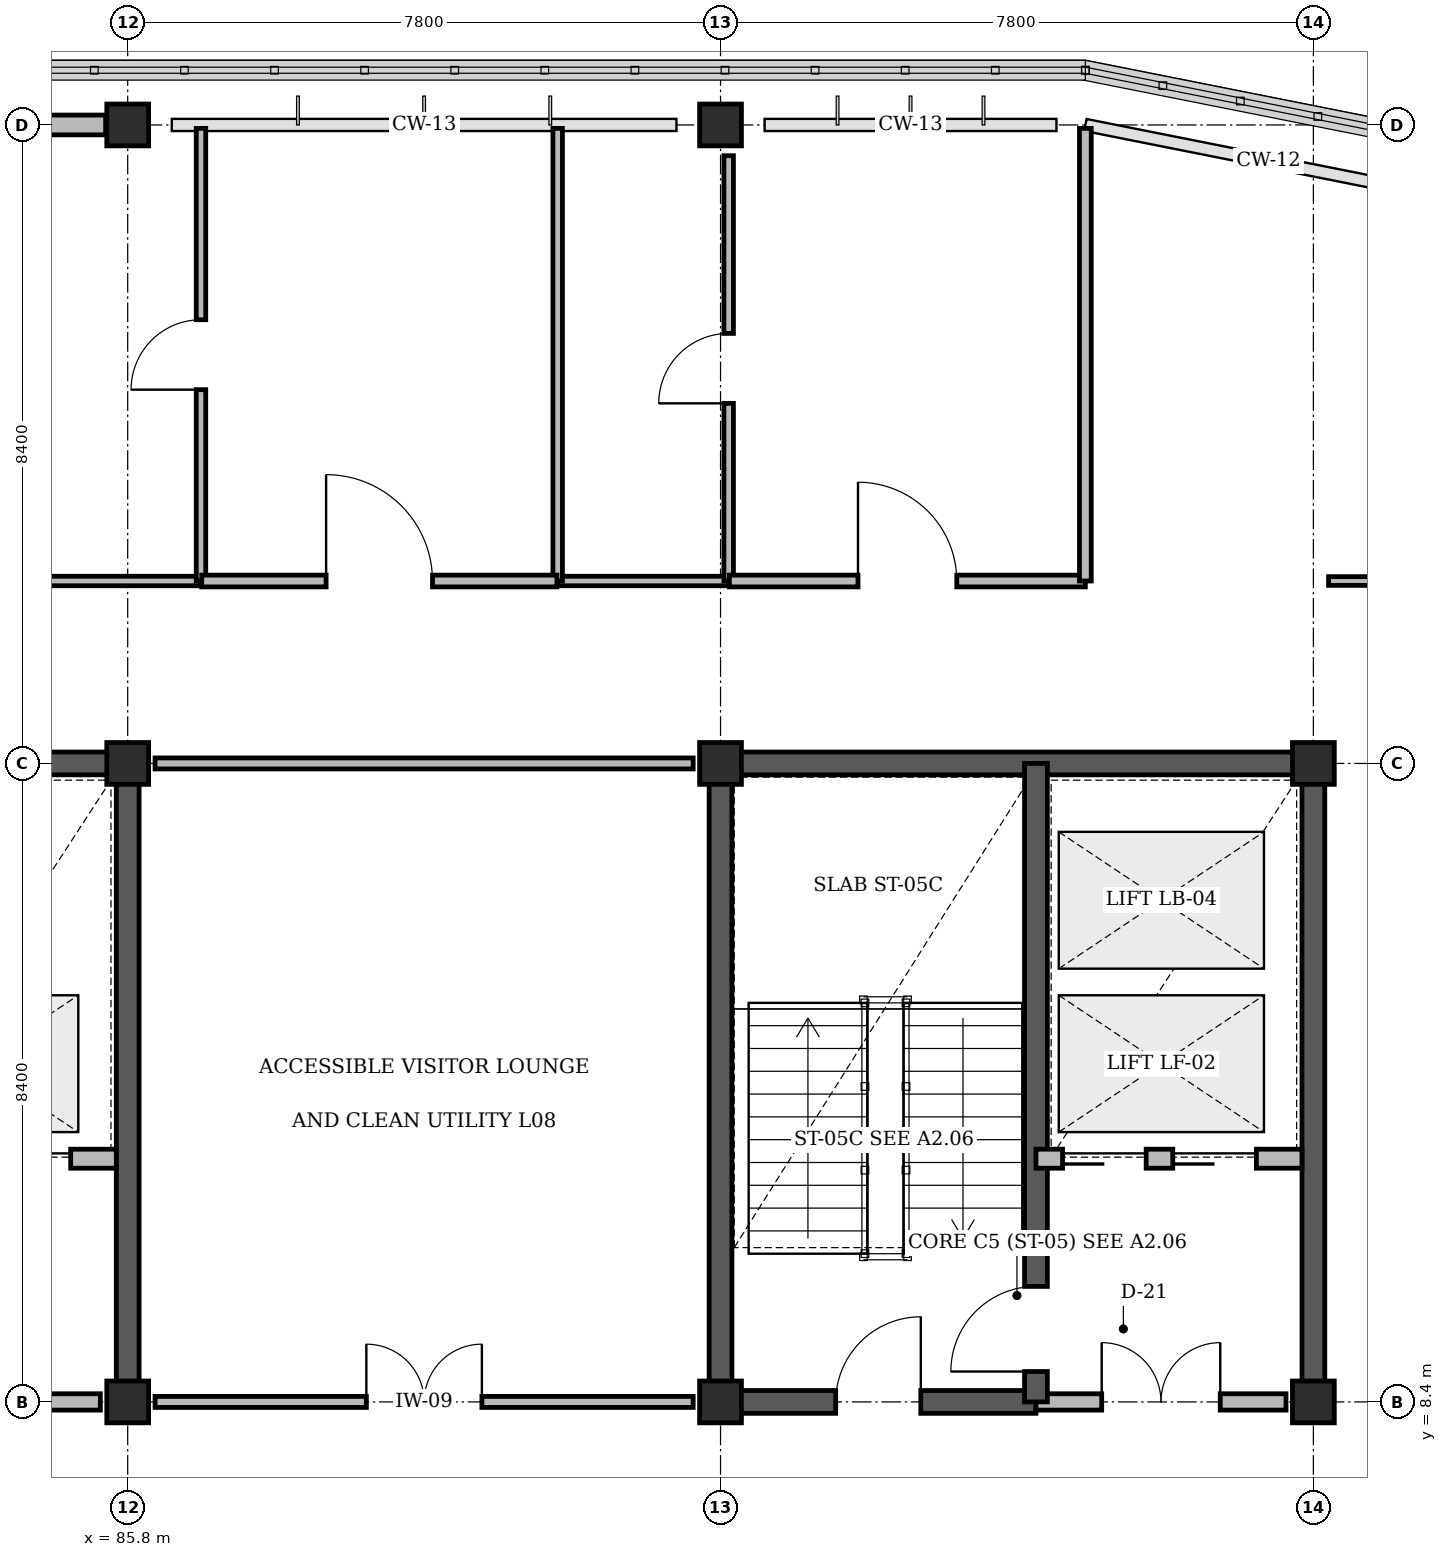
"""IFC4 building model, lengths in metres.
Left out: names, types, materials, properties, quantities, classifications, styles, units other than length and angle.
Written with IfcOpenShell. Run it as: python <this file> out.ifc"""

import sys

from ifc_helpers import new_model, si_unit, direction, frame, frame_2d, origin, origin_2d, place, context, subcontext, project, spatial, rectangle, extrude, element, fill, save


model = new_model("IFC4")
c1 = context("Model", 3, precision=1e-05, world=origin(), true_north=direction((0.0, 1.0)))
c2 = subcontext(c1, "Body", "Model", "MODEL_VIEW")
j1 = project(units=[si_unit("LENGTHUNIT", "METRE"), si_unit("PLANEANGLEUNIT", "RADIAN")], contexts=[c1])
p1 = place(None, origin())
s1 = spatial("IfcSite", under=j1, at=p1, CompositionType="ELEMENT")
p2 = place(p1, origin())
s2 = spatial("IfcBuilding", under=s1, at=p2, CompositionType="ELEMENT")
p3 = place(p2, frame((0.0, 0.0, 34.8)))
s3 = spatial("IfcBuildingStorey", under=s2, at=p3, CompositionType="ELEMENT", Elevation=34.8)
p4 = place(p3, frame((77.85, 16.8, 0.0), z_axis=(0.0, 0.0, 1.0), x_axis=(1.0, 0.0, 0.0)))
e1 = element("IfcWall", 1, at=p4, inside=s3, PredefinedType="SHEAR", context=c2, shape_type="SweptSolid", body=[
    extrude(rectangle(XDim=8.1, YDim=0.3, at=frame_2d((4.05, 0.0))), origin(), (0.0, 0.0, 1.0), 3.92),
])
p5 = place(p3, frame((85.8, 8.4, 0.0), z_axis=(0.0, 0.0, 1.0), x_axis=(0.0, 1.0, 0.0)))
e2 = element("IfcWall", 2, at=p5, inside=s3, PredefinedType="SHEAR", context=c2, shape_type="SweptSolid", body=[
    extrude(rectangle(XDim=8.4, YDim=0.3, at=frame_2d((4.2, 0.0))), origin(), (0.0, 0.0, 1.0), 3.92),
])
p6 = place(p3, frame((93.45, 16.8, 0.0), z_axis=(0.0, 0.0, 1.0), x_axis=(1.0, 0.0, 0.0)))
e3 = element("IfcWall", 3, at=p6, inside=s3, PredefinedType="SHEAR", context=c2, shape_type="SweptSolid", body=[
    extrude(rectangle(XDim=8.1, YDim=0.3, at=frame_2d((4.05, 0.0))), origin(), (0.0, 0.0, 1.0), 3.92),
])
for number, where, z_axis, x_axis in (
    (4, (93.6, 8.4, 0.0), (0.0, 0.0, 1.0), (0.0, 1.0, 0.0)),
    (5, (101.4, 8.4, 0.0), (0.0, 0.0, 1.0), (0.0, 1.0, 0.0)),
):
    element("IfcWall", number, at=place(p3, frame(where, z_axis=z_axis, x_axis=x_axis)), inside=s3, PredefinedType="SHEAR", context=c2, shape_type="SweptSolid", body=[
        extrude(rectangle(XDim=8.4, YDim=0.3, at=frame_2d((4.2, 0.0))), origin(), (0.0, 0.0, 1.0), 3.92),
    ])
for number, where, z_axis, x_axis in (
    (6, (85.8, 8.4, 0.0), (0.0, 0.0, 1.0), (1.0, 0.0, 0.0)),
    (7, (85.8, 16.8, 0.0), (0.0, 0.0, 1.0), (1.0, 0.0, 0.0)),
    (8, (85.8, 25.2, 0.0), (0.0, 0.0, 1.0), (1.0, 0.0, 0.0)),
    (9, (93.6, 8.4, 0.0), (0.0, 0.0, 1.0), (1.0, 0.0, 0.0)),
    (10, (93.6, 16.8, 0.0), (0.0, 0.0, 1.0), (1.0, 0.0, 0.0)),
    (11, (93.6, 25.2, 0.0), (0.0, 0.0, 1.0), (1.0, 0.0, 0.0)),
    (12, (101.4, 8.4, 0.0), (0.0, 0.0, 1.0), (1.0, 0.0, 0.0)),
    (13, (101.4, 16.8, 0.0), (0.0, 0.0, 1.0), (1.0, 0.0, 0.0)),
):
    element("IfcColumn", number, at=place(p3, frame(where, z_axis=z_axis, x_axis=x_axis)), inside=s3, PredefinedType="COLUMN", context=c2, shape_type="SweptSolid", body=[
        extrude(rectangle(XDim=0.55, YDim=0.55, at=origin_2d()), origin(), (0.0, 0.0, 1.0), 4.2),
    ])
p7 = place(p3, frame((78.29, 25.2, 0.0), z_axis=(0.0, 0.0, 1.0), x_axis=(1.0, 0.0, 0.0)))
e14 = element("IfcWall", 14, at=p7, inside=s3, PredefinedType="STANDARD", context=c2, shape_type="SweptSolid", body=[
    extrude(rectangle(XDim=7.22, YDim=0.26, at=frame_2d((3.61, 0.0))), origin(), (0.0, 0.0, 1.0), 3.355),
])
p8 = place(p7, frame((1.607, 0.0, 0.85)))
e15 = element("IfcOpeningElement", 15, at=p8, cuts=e14, PredefinedType="OPENING", context=c2, shape_type="SweptSolid", body=[
    extrude(rectangle(XDim=1.2, YDim=1.5, at=frame_2d((0.6, 0.75))), frame((0.0, 0.14, 0.0), z_axis=(0.0, -1.0, 0.0), x_axis=(1.0, 0.0, 0.0)), (0.0, 0.0, 1.0), 0.28),
])
p9 = place(p7, frame((4.413, 0.0, 0.85)))
e16 = element("IfcOpeningElement", 16, at=p9, cuts=e14, PredefinedType="OPENING", context=c2, shape_type="SweptSolid", body=[
    extrude(rectangle(XDim=1.2, YDim=1.5, at=frame_2d((0.6, 0.75))), frame((0.0, 0.14, 0.0), z_axis=(0.0, -1.0, 0.0), x_axis=(1.0, 0.0, 0.0)), (0.0, 0.0, 1.0), 0.28),
])
p10 = place(p3, frame((82.15, 8.4, 0.0), z_axis=(0.0, 0.0, 1.0), x_axis=(1.0, 0.0, 0.0)))
e17 = element("IfcWall", 17, at=p10, inside=s3, PredefinedType="STANDARD", context=c2, shape_type="SweptSolid", body=[
    extrude(rectangle(XDim=3.29, YDim=0.215, at=frame_2d((1.645, 0.0))), origin(), (0.0, 0.0, 1.0), 3.32),
])
p11 = place(p10, frame((0.925, 0.0, 0.0)))
e18 = element("IfcOpeningElement", 18, at=p11, cuts=e17, PredefinedType="OPENING", context=c2, shape_type="SweptSolid", body=[
    extrude(rectangle(XDim=1.44, YDim=2.2, at=frame_2d((0.72, 1.1))), frame((0.0, 0.118, 0.0), z_axis=(0.0, -1.0, 0.0), x_axis=(1.0, 0.0, 0.0)), (0.0, 0.0, 1.0), 0.235),
])
p12 = place(p3, frame((82.15, 11.6, 0.0), z_axis=(0.0, 0.0, 1.0), x_axis=(1.0, 0.0, 0.0)))
e19 = element("IfcWall", 19, at=p12, inside=s3, PredefinedType="STANDARD", context=c2, shape_type="SweptSolid", body=[
    extrude(rectangle(XDim=3.5, YDim=0.25, at=frame_2d((1.75, 0.0))), origin(), (0.0, 0.0, 1.0), 3.9),
])
p13 = place(p12, frame((0.35, 0.0, 0.0)))
e20 = element("IfcOpeningElement", 20, at=p13, cuts=e19, PredefinedType="OPENING", context=c2, shape_type="SweptSolid", body=[
    extrude(rectangle(XDim=1.1, YDim=2.2, at=frame_2d((0.55, 1.1))), frame((0.0, 0.135, 0.0), z_axis=(0.0, -1.0, 0.0), x_axis=(1.0, 0.0, 0.0)), (0.0, 0.0, 1.0), 0.27),
])
p14 = place(p12, frame((1.8, 0.0, 0.0)))
e21 = element("IfcOpeningElement", 21, at=p14, cuts=e19, PredefinedType="OPENING", context=c2, shape_type="SweptSolid", body=[
    extrude(rectangle(XDim=1.1, YDim=2.2, at=frame_2d((0.55, 1.1))), frame((0.0, 0.135, 0.0), z_axis=(0.0, -1.0, 0.0), x_axis=(1.0, 0.0, 0.0)), (0.0, 0.0, 1.0), 0.27),
])
p15 = place(p3, frame((93.6, 8.4, 0.0), z_axis=(0.0, 0.0, 1.0), x_axis=(1.0, 0.0, 0.0)))
e22 = element("IfcWall", 22, at=p15, inside=s3, PredefinedType="SHEAR", context=c2, shape_type="SweptSolid", body=[
    extrude(rectangle(XDim=4.15, YDim=0.3, at=frame_2d((2.075, 0.0))), origin(), (0.0, 0.0, 1.0), 4.2),
])
p16 = place(p15, frame((1.515, 0.0, 0.0)))
e23 = element("IfcOpeningElement", 23, at=p16, cuts=e22, PredefinedType="OPENING", context=c2, shape_type="SweptSolid", body=[
    extrude(rectangle(XDim=1.12, YDim=2.15, at=frame_2d((0.56, 1.075))), frame((0.0, 0.16, 0.0), z_axis=(0.0, -1.0, 0.0), x_axis=(1.0, 0.0, 0.0)), (0.0, 0.0, 1.0), 0.32),
])
p17 = place(p3, frame((97.75, 8.4, 0.0), z_axis=(0.0, 0.0, 1.0), x_axis=(1.0, 0.0, 0.0)))
e24 = element("IfcWall", 24, at=p17, inside=s3, PredefinedType="STANDARD", context=c2, shape_type="SweptSolid", body=[
    extrude(rectangle(XDim=3.29, YDim=0.215, at=frame_2d((1.645, 0.0))), origin(), (0.0, 0.0, 1.0), 3.32),
])
p18 = place(p17, frame((0.865, 0.0, 0.0)))
e25 = element("IfcOpeningElement", 25, at=p18, cuts=e24, PredefinedType="OPENING", context=c2, shape_type="SweptSolid", body=[
    extrude(rectangle(XDim=1.56, YDim=2.2, at=frame_2d((0.78, 1.1))), frame((0.0, 0.118, 0.0), z_axis=(0.0, -1.0, 0.0), x_axis=(1.0, 0.0, 0.0)), (0.0, 0.0, 1.0), 0.235),
])
p19 = place(p3, frame((97.75, 8.4, 0.0), z_axis=(0.0, 0.0, 1.0), x_axis=(0.0, 1.0, 0.0)))
e26 = element("IfcWall", 26, at=p19, inside=s3, PredefinedType="SHEAR", context=c2, shape_type="SweptSolid", body=[
    extrude(rectangle(XDim=8.4, YDim=0.3, at=frame_2d((4.2, 0.0))), origin(), (0.0, 0.0, 1.0), 4.2),
])
p20 = place(p19, frame((0.4, 0.0, 0.0)))
e27 = element("IfcOpeningElement", 27, at=p20, cuts=e26, PredefinedType="OPENING", context=c2, shape_type="SweptSolid", body=[
    extrude(rectangle(XDim=1.12, YDim=2.15, at=frame_2d((0.56, 1.075))), frame((0.0, 0.16, 0.0), z_axis=(0.0, -1.0, 0.0), x_axis=(1.0, 0.0, 0.0)), (0.0, 0.0, 1.0), 0.32),
])
p21 = place(p3, frame((97.75, 11.6, 0.0), z_axis=(0.0, 0.0, 1.0), x_axis=(1.0, 0.0, 0.0)))
e28 = element("IfcWall", 28, at=p21, inside=s3, PredefinedType="STANDARD", context=c2, shape_type="SweptSolid", body=[
    extrude(rectangle(XDim=3.5, YDim=0.25, at=frame_2d((1.75, 0.0))), origin(), (0.0, 0.0, 1.0), 3.9),
])
p22 = place(p21, frame((0.35, 0.0, 0.0)))
e29 = element("IfcOpeningElement", 29, at=p22, cuts=e28, PredefinedType="OPENING", context=c2, shape_type="SweptSolid", body=[
    extrude(rectangle(XDim=1.1, YDim=2.2, at=frame_2d((0.55, 1.1))), frame((0.0, 0.135, 0.0), z_axis=(0.0, -1.0, 0.0), x_axis=(1.0, 0.0, 0.0)), (0.0, 0.0, 1.0), 0.27),
])
p23 = place(p21, frame((1.8, 0.0, 0.0)))
e30 = element("IfcOpeningElement", 30, at=p23, cuts=e28, PredefinedType="OPENING", context=c2, shape_type="SweptSolid", body=[
    extrude(rectangle(XDim=1.1, YDim=2.2, at=frame_2d((0.55, 1.1))), frame((0.0, 0.135, 0.0), z_axis=(0.0, -1.0, 0.0), x_axis=(1.0, 0.0, 0.0)), (0.0, 0.0, 1.0), 0.27),
])
p24 = place(p3, frame((84.514, 19.2, 0.0), z_axis=(0.0, 0.0, 1.0), x_axis=(1.0, 0.0, 0.0)))
e31 = element("IfcWall", 31, at=p24, inside=s3, PredefinedType="PARTITIONING", context=c2, shape_type="SweptSolid", body=[
    extrude(rectangle(XDim=2.25, YDim=0.125, at=frame_2d((1.125, 0.0))), origin(), (0.0, 0.0, 1.0), 3.9),
])
p25 = place(p3, frame((86.764, 19.2, 0.0), z_axis=(0.0, 0.0, 1.0), x_axis=(0.0, 1.0, 0.0)))
e32 = element("IfcWall", 32, at=p25, inside=s3, PredefinedType="PARTITIONING", context=c2, shape_type="SweptSolid", body=[
    extrude(rectangle(XDim=5.955, YDim=0.125, at=frame_2d((2.978, 0.0))), origin(), (0.0, 0.0, 1.0), 3.9),
])
p26 = place(p25, frame((2.518, 0.0, 0.0)))
e33 = element("IfcOpeningElement", 33, at=p26, cuts=e32, PredefinedType="OPENING", context=c2, shape_type="SweptSolid", body=[
    extrude(rectangle(XDim=0.92, YDim=2.1, at=frame_2d((0.46, 1.05))), frame((0.0, 0.073, 0.0), z_axis=(0.0, -1.0, 0.0), x_axis=(1.0, 0.0, 0.0)), (0.0, 0.0, 1.0), 0.145),
])
p27 = place(p3, frame((91.457, 19.2, 0.0), z_axis=(0.0, 0.0, 1.0), x_axis=(1.0, 0.0, 0.0)))
e34 = element("IfcWall", 34, at=p27, inside=s3, PredefinedType="PARTITIONING", context=c2, shape_type="SweptSolid", body=[
    extrude(rectangle(XDim=2.25, YDim=0.125, at=frame_2d((1.125, 0.0))), origin(), (0.0, 0.0, 1.0), 3.9),
])
p28 = place(p3, frame((91.457, 19.2, 0.0), z_axis=(0.0, 0.0, 1.0), x_axis=(0.0, 1.0, 0.0)))
e35 = element("IfcWall", 35, at=p28, inside=s3, PredefinedType="PARTITIONING", context=c2, shape_type="SweptSolid", body=[
    extrude(rectangle(XDim=5.955, YDim=0.125, at=frame_2d((2.978, 0.0))), origin(), (0.0, 0.0, 1.0), 3.9),
])
p29 = place(p3, frame((93.707, 19.2, 0.0), z_axis=(0.0, 0.0, 1.0), x_axis=(0.0, 1.0, 0.0)))
e36 = element("IfcWall", 36, at=p29, inside=s3, PredefinedType="PARTITIONING", context=c2, shape_type="SweptSolid", body=[
    extrude(rectangle(XDim=5.595, YDim=0.125, at=frame_2d((2.797, 0.0))), origin(), (0.0, 0.0, 1.0), 3.305),
])
p30 = place(p29, frame((2.337, 0.0, 0.0)))
e37 = element("IfcOpeningElement", 37, at=p30, cuts=e36, PredefinedType="OPENING", context=c2, shape_type="SweptSolid", body=[
    extrude(rectangle(XDim=0.92, YDim=2.1, at=frame_2d((0.46, 1.05))), frame((0.0, 0.073, 0.0), z_axis=(0.0, -1.0, 0.0), x_axis=(1.0, 0.0, 0.0)), (0.0, 0.0, 1.0), 0.145),
])
p31 = place(p3, frame((101.6, 19.2, 0.0), z_axis=(0.0, 0.0, 1.0), x_axis=(1.0, 0.0, 0.0)))
e38 = element("IfcWall", 38, at=p31, inside=s3, PredefinedType="PARTITIONING", context=c2, shape_type="SweptSolid", body=[
    extrude(rectangle(XDim=8.9, YDim=0.115, at=frame_2d((4.45, 0.0))), origin(), (0.0, 0.0, 1.0), 3.9),
])
p32 = place(p3, frame((86.774, 19.2, 0.0), z_axis=(0.0, 0.0, 1.0), x_axis=(1.0, 0.0, 0.0)))
e39 = element("IfcWall", 39, at=p32, inside=s3, PredefinedType="PARTITIONING", context=c2, shape_type="SweptSolid", body=[
    extrude(rectangle(XDim=4.673, YDim=0.155, at=frame_2d((2.336, 0.0))), origin(), (0.0, 0.0, 1.0), 3.9),
])
p33 = place(p32, frame((1.636, 0.0, 0.0)))
e40 = element("IfcOpeningElement", 40, at=p33, cuts=e39, PredefinedType="OPENING", context=c2, shape_type="SweptSolid", body=[
    extrude(rectangle(XDim=1.4, YDim=2.2, at=frame_2d((0.7, 1.1))), frame((0.0, 0.087, 0.0), z_axis=(0.0, -1.0, 0.0), x_axis=(1.0, 0.0, 0.0)), (0.0, 0.0, 1.0), 0.175),
])
p34 = place(p3, frame((93.717, 19.2, 0.0), z_axis=(0.0, 0.0, 1.0), x_axis=(1.0, 0.0, 0.0)))
e41 = element("IfcWall", 41, at=p34, inside=s3, PredefinedType="PARTITIONING", context=c2, shape_type="SweptSolid", body=[
    extrude(rectangle(XDim=4.683, YDim=0.155, at=frame_2d((2.341, 0.0))), origin(), (0.0, 0.0, 1.0), 3.9),
])
p35 = place(p34, frame((1.691, 0.0, 0.0)))
e42 = element("IfcOpeningElement", 42, at=p35, cuts=e41, PredefinedType="OPENING", context=c2, shape_type="SweptSolid", body=[
    extrude(rectangle(XDim=1.3, YDim=2.15, at=frame_2d((0.65, 1.075))), frame((0.0, 0.087, 0.0), z_axis=(0.0, -1.0, 0.0), x_axis=(1.0, 0.0, 0.0)), (0.0, 0.0, 1.0), 0.175),
])
p36 = place(p3, frame((98.4, 19.2, 0.0), z_axis=(0.0, 0.0, 1.0), x_axis=(0.0, 1.0, 0.0)))
e43 = element("IfcWall", 43, at=p36, inside=s3, PredefinedType="PARTITIONING", context=c2, shape_type="SweptSolid", body=[
    extrude(rectangle(XDim=5.955, YDim=0.155, at=frame_2d((2.978, 0.0))), origin(), (0.0, 0.0, 1.0), 3.9),
])
p37 = place(p3, frame((86.16, 8.4, 0.0), z_axis=(0.0, 0.0, 1.0), x_axis=(1.0, 0.0, 0.0)))
e44 = element("IfcWall", 44, at=p37, inside=s3, PredefinedType="PARTITIONING", context=c2, shape_type="SweptSolid", body=[
    extrude(rectangle(XDim=7.08, YDim=0.145, at=frame_2d((3.54, 0.0))), origin(), (0.0, 0.0, 1.0), 3.32),
])
p38 = place(p37, frame((2.78, 0.0, 0.0)))
e45 = element("IfcOpeningElement", 45, at=p38, cuts=e44, PredefinedType="OPENING", context=c2, shape_type="SweptSolid", body=[
    extrude(rectangle(XDim=1.52, YDim=2.2, at=frame_2d((0.76, 1.1))), frame((0.0, 0.083, 0.0), z_axis=(0.0, -1.0, 0.0), x_axis=(1.0, 0.0, 0.0)), (0.0, 0.0, 1.0), 0.165),
])
p39 = place(p3, frame((86.16, 16.8, 0.0), z_axis=(0.0, 0.0, 1.0), x_axis=(1.0, 0.0, 0.0)))
e46 = element("IfcWall", 46, at=p39, inside=s3, PredefinedType="PARTITIONING", context=c2, shape_type="SweptSolid", body=[
    extrude(rectangle(XDim=7.08, YDim=0.145, at=frame_2d((3.54, 0.0))), origin(), (0.0, 0.0, 1.0), 3.32),
])
p40 = place(p14, origin())
e47 = element("IfcDoor", 47, at=p40, inside=s3, OperationType="SLIDING_TO_LEFT", PredefinedType="DOOR", context=c2, shape_type="SweptSolid", body=[
    extrude(rectangle(XDim=1.1, YDim=2.2, at=frame_2d((0.55, 1.1))), frame((0.0, 0.025, 0.0), z_axis=(0.0, -1.0, 0.0), x_axis=(1.0, 0.0, 0.0)), (0.0, 0.0, 1.0), 0.05),
])
fill(e21, e47)
p41 = place(p16, origin())
e48 = element("IfcDoor", 48, at=p41, inside=s3, OperationType="SINGLE_SWING_RIGHT", PredefinedType="DOOR", context=c2, shape_type="SweptSolid", body=[
    extrude(rectangle(XDim=1.12, YDim=2.15, at=frame_2d((0.56, 1.075))), frame((0.0, 0.025, 0.0), z_axis=(0.0, -1.0, 0.0), x_axis=(1.0, 0.0, 0.0)), (0.0, 0.0, 1.0), 0.05),
])
fill(e23, e48)
p42 = place(p18, origin())
e49 = element("IfcDoor", 49, at=p42, inside=s3, OperationType="DOUBLE_DOOR_SINGLE_SWING", PredefinedType="DOOR", context=c2, shape_type="SweptSolid", body=[
    extrude(rectangle(XDim=1.56, YDim=2.2, at=frame_2d((0.78, 1.1))), frame((0.0, 0.025, 0.0), z_axis=(0.0, -1.0, 0.0), x_axis=(1.0, 0.0, 0.0)), (0.0, 0.0, 1.0), 0.05),
])
fill(e25, e49)
p43 = place(p20, origin())
e50 = element("IfcDoor", 50, at=p43, inside=s3, OperationType="SINGLE_SWING_LEFT", PredefinedType="DOOR", context=c2, shape_type="SweptSolid", body=[
    extrude(rectangle(XDim=1.12, YDim=2.15, at=frame_2d((0.56, 1.075))), frame((0.0, 0.025, 0.0), z_axis=(0.0, -1.0, 0.0), x_axis=(1.0, 0.0, 0.0)), (0.0, 0.0, 1.0), 0.05),
])
fill(e27, e50)
p44 = place(p22, origin())
e51 = element("IfcDoor", 51, at=p44, inside=s3, OperationType="SLIDING_TO_LEFT", PredefinedType="DOOR", context=c2, shape_type="SweptSolid", body=[
    extrude(rectangle(XDim=1.1, YDim=2.2, at=frame_2d((0.55, 1.1))), frame((0.0, 0.025, 0.0), z_axis=(0.0, -1.0, 0.0), x_axis=(1.0, 0.0, 0.0)), (0.0, 0.0, 1.0), 0.05),
])
fill(e29, e51)
p45 = place(p23, origin())
e52 = element("IfcDoor", 52, at=p45, inside=s3, OperationType="SLIDING_TO_LEFT", PredefinedType="DOOR", context=c2, shape_type="SweptSolid", body=[
    extrude(rectangle(XDim=1.1, YDim=2.2, at=frame_2d((0.55, 1.1))), frame((0.0, 0.025, 0.0), z_axis=(0.0, -1.0, 0.0), x_axis=(1.0, 0.0, 0.0)), (0.0, 0.0, 1.0), 0.05),
])
fill(e30, e52)
p46 = place(p26, origin())
e53 = element("IfcDoor", 53, at=p46, inside=s3, OperationType="SINGLE_SWING_LEFT", PredefinedType="DOOR", context=c2, shape_type="SweptSolid", body=[
    extrude(rectangle(XDim=0.92, YDim=2.1, at=frame_2d((0.46, 1.05))), frame((0.0, 0.025, 0.0), z_axis=(0.0, -1.0, 0.0), x_axis=(1.0, 0.0, 0.0)), (0.0, 0.0, 1.0), 0.05),
])
fill(e33, e53)
p47 = place(p30, origin())
e54 = element("IfcDoor", 54, at=p47, inside=s3, OperationType="SINGLE_SWING_LEFT", PredefinedType="DOOR", context=c2, shape_type="SweptSolid", body=[
    extrude(rectangle(XDim=0.92, YDim=2.1, at=frame_2d((0.46, 1.05))), frame((0.0, 0.025, 0.0), z_axis=(0.0, -1.0, 0.0), x_axis=(1.0, 0.0, 0.0)), (0.0, 0.0, 1.0), 0.05),
])
fill(e37, e54)
p48 = place(p33, origin())
e55 = element("IfcDoor", 55, at=p48, inside=s3, OperationType="SINGLE_SWING_LEFT", PredefinedType="DOOR", context=c2, shape_type="SweptSolid", body=[
    extrude(rectangle(XDim=1.4, YDim=2.2, at=frame_2d((0.7, 1.1))), frame((0.0, 0.025, 0.0), z_axis=(0.0, -1.0, 0.0), x_axis=(1.0, 0.0, 0.0)), (0.0, 0.0, 1.0), 0.05),
])
fill(e40, e55)
p49 = place(p35, origin())
e56 = element("IfcDoor", 56, at=p49, inside=s3, OperationType="SINGLE_SWING_LEFT", PredefinedType="DOOR", context=c2, shape_type="SweptSolid", body=[
    extrude(rectangle(XDim=1.3, YDim=2.15, at=frame_2d((0.65, 1.075))), frame((0.0, 0.025, 0.0), z_axis=(0.0, -1.0, 0.0), x_axis=(1.0, 0.0, 0.0)), (0.0, 0.0, 1.0), 0.05),
])
fill(e42, e56)
p50 = place(p38, origin())
e57 = element("IfcDoor", 57, at=p50, inside=s3, OperationType="DOUBLE_DOOR_SINGLE_SWING", PredefinedType="DOOR", context=c2, shape_type="SweptSolid", body=[
    extrude(rectangle(XDim=1.52, YDim=2.2, at=frame_2d((0.76, 1.1))), frame((0.0, 0.025, 0.0), z_axis=(0.0, -1.0, 0.0), x_axis=(1.0, 0.0, 0.0)), (0.0, 0.0, 1.0), 0.05),
])
fill(e45, e57)
save(model, sys.argv[1])
